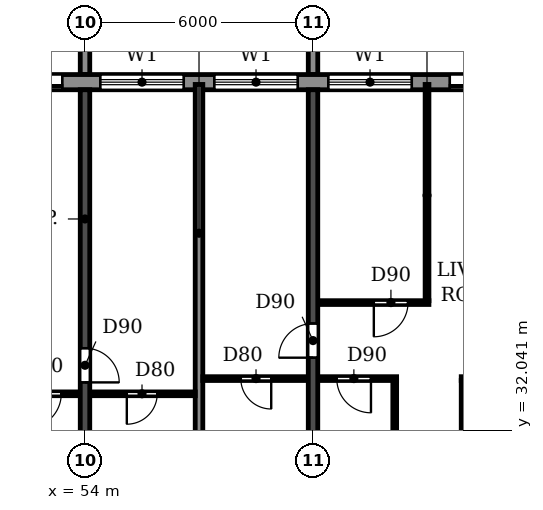
"""IFC4 building model, lengths in metres.
Left out: names, types, materials, properties, quantities, classifications, styles, units other than length and angle.
Written with IfcOpenShell. Run it as: python <this file> out.ifc"""

import sys

from ifc_helpers import new_model, si_unit, direction, frame, frame_2d, origin, place, context, subcontext, project, spatial, polyline, rectangle, outline, extrude, source, transform, mapped, element, fill, save


model = new_model("IFC4")
c1 = context("Model", 3, precision=1e-05, world=origin(), true_north=direction((0.0, 1.0)))
c2 = subcontext(c1, "Body", "Model", "MODEL_VIEW")
j1 = project(units=[si_unit("LENGTHUNIT", "METRE"), si_unit("PLANEANGLEUNIT", "RADIAN")], contexts=[c1])
p1 = place(None, origin())
s1 = spatial("IfcSite", under=j1, at=p1, CompositionType="ELEMENT")
p2 = place(p1, origin())
s2 = spatial("IfcBuilding", under=s1, at=p2, CompositionType="ELEMENT")
p3 = place(p2, frame((0.0, 0.0, 231.3)))
s3 = spatial("IfcBuildingStorey", under=s2, at=p3, CompositionType="ELEMENT", Elevation=231.3)
p4 = place(p3, frame((54.0, 30.5, 0.0), z_axis=(0.0, 0.0, 1.0), x_axis=(0.0, 1.0, 0.0)))
e1 = element("IfcWall", 1, at=p4, inside=s3, PredefinedType="SHEAR", context=c2, shape_type="SweptSolid", body=[
    extrude(rectangle(XDim=10.5, YDim=0.25, at=frame_2d((5.25, 0.0))), origin(), (0.0, 0.0, 1.0), 3.08),
])
p5 = place(p4, frame((2.8, 0.0, 0.0)))
e2 = element("IfcOpeningElement", 2, at=p5, cuts=e1, PredefinedType="OPENING", context=c2, shape_type="SweptSolid", body=[
    extrude(rectangle(XDim=0.9, YDim=2.1, at=frame_2d((0.45, 1.05))), frame((0.0, 0.135, 0.0), z_axis=(0.0, -1.0, 0.0), x_axis=(1.0, 0.0, 0.0)), (0.0, 0.0, 1.0), 0.27),
])
p6 = place(p3, frame((60.0, 30.5, 0.0), z_axis=(0.0, 0.0, 1.0), x_axis=(0.0, 1.0, 0.0)))
e3 = element("IfcWall", 3, at=p6, inside=s3, PredefinedType="SHEAR", context=c2, shape_type="SweptSolid", body=[
    extrude(rectangle(XDim=10.5, YDim=0.25, at=frame_2d((5.25, 0.0))), origin(), (0.0, 0.0, 1.0), 3.08),
])
p7 = place(p6, frame((3.45, 0.0, 0.0)))
e4 = element("IfcOpeningElement", 4, at=p7, cuts=e3, PredefinedType="OPENING", context=c2, shape_type="SweptSolid", body=[
    extrude(rectangle(XDim=0.9, YDim=2.1, at=frame_2d((0.45, 1.05))), frame((0.0, 0.135, 0.0), z_axis=(0.0, -1.0, 0.0), x_axis=(1.0, 0.0, 0.0)), (0.0, 0.0, 1.0), 0.27),
])
p8 = place(p3, frame((79.317, 41.2, 0.0), z_axis=(0.0, 0.0, 1.0), x_axis=(-1.0, 0.0, 0.0)))
e5 = element("IfcWall", 5, at=p8, inside=s3, PredefinedType="STANDARD", context=c2, shape_type="SweptSolid", body=[
    extrude(rectangle(XDim=56.634, YDim=0.4, at=frame_2d((28.317, 0.0))), origin(), (0.0, 0.0, 1.0), 3.08),
])
p9 = place(p8, frame((52.917, 0.0, 0.0)))
e6 = element("IfcOpeningElement", 6, at=p9, cuts=e5, PredefinedType="OPENING", context=c2, shape_type="SweptSolid", body=[
    extrude(rectangle(XDim=1.8, YDim=2.4, at=frame_2d((0.9, 1.2))), frame((0.0, 0.21, 0.0), z_axis=(0.0, -1.0, 0.0), x_axis=(1.0, 0.0, 0.0)), (0.0, 0.0, 1.0), 0.42),
])
p10 = place(p8, frame((49.717, 0.0, 0.9)))
e7 = element("IfcOpeningElement", 7, at=p10, cuts=e5, PredefinedType="OPENING", context=c2, shape_type="SweptSolid", body=[
    extrude(rectangle(XDim=2.2, YDim=1.5, at=frame_2d((1.1, 0.75))), frame((0.0, 0.21, 0.0), z_axis=(0.0, -1.0, 0.0), x_axis=(1.0, 0.0, 0.0)), (0.0, 0.0, 1.0), 0.42),
])
p11 = place(p8, frame((46.717, 0.0, 0.9)))
e8 = element("IfcOpeningElement", 8, at=p11, cuts=e5, PredefinedType="OPENING", context=c2, shape_type="SweptSolid", body=[
    extrude(rectangle(XDim=2.2, YDim=1.5, at=frame_2d((1.1, 0.75))), frame((0.0, 0.21, 0.0), z_axis=(0.0, -1.0, 0.0), x_axis=(1.0, 0.0, 0.0)), (0.0, 0.0, 1.0), 0.42),
])
p12 = place(p8, frame((43.717, 0.0, 0.9)))
e9 = element("IfcOpeningElement", 9, at=p12, cuts=e5, PredefinedType="OPENING", context=c2, shape_type="SweptSolid", body=[
    extrude(rectangle(XDim=2.2, YDim=1.5, at=frame_2d((1.1, 0.75))), frame((0.0, 0.21, 0.0), z_axis=(0.0, -1.0, 0.0), x_axis=(1.0, 0.0, 0.0)), (0.0, 0.0, 1.0), 0.42),
])
p13 = place(p8, frame((40.717, 0.0, 0.9)))
e10 = element("IfcOpeningElement", 10, at=p13, cuts=e5, PredefinedType="OPENING", context=c2, shape_type="SweptSolid", body=[
    extrude(rectangle(XDim=2.2, YDim=1.5, at=frame_2d((1.1, 0.75))), frame((0.0, 0.21, 0.0), z_axis=(0.0, -1.0, 0.0), x_axis=(1.0, 0.0, 0.0)), (0.0, 0.0, 1.0), 0.42),
])
p14 = place(p8, frame((37.917, 0.0, 0.0)))
e11 = element("IfcOpeningElement", 11, at=p14, cuts=e5, PredefinedType="OPENING", context=c2, shape_type="SweptSolid", body=[
    extrude(rectangle(XDim=1.8, YDim=2.4, at=frame_2d((0.9, 1.2))), frame((0.0, 0.21, 0.0), z_axis=(0.0, -1.0, 0.0), x_axis=(1.0, 0.0, 0.0)), (0.0, 0.0, 1.0), 0.42),
])
p15 = place(p8, frame((34.717, 0.0, 0.9)))
e12 = element("IfcOpeningElement", 12, at=p15, cuts=e5, PredefinedType="OPENING", context=c2, shape_type="SweptSolid", body=[
    extrude(rectangle(XDim=2.2, YDim=1.5, at=frame_2d((1.1, 0.75))), frame((0.0, 0.21, 0.0), z_axis=(0.0, -1.0, 0.0), x_axis=(1.0, 0.0, 0.0)), (0.0, 0.0, 1.0), 0.42),
])
p16 = place(p8, frame((31.917, 0.0, 0.0)))
e13 = element("IfcOpeningElement", 13, at=p16, cuts=e5, PredefinedType="OPENING", context=c2, shape_type="SweptSolid", body=[
    extrude(rectangle(XDim=1.8, YDim=2.4, at=frame_2d((0.9, 1.2))), frame((0.0, 0.21, 0.0), z_axis=(0.0, -1.0, 0.0), x_axis=(1.0, 0.0, 0.0)), (0.0, 0.0, 1.0), 0.42),
])
p17 = place(p8, frame((28.717, 0.0, 0.9)))
e14 = element("IfcOpeningElement", 14, at=p17, cuts=e5, PredefinedType="OPENING", context=c2, shape_type="SweptSolid", body=[
    extrude(rectangle(XDim=2.2, YDim=1.5, at=frame_2d((1.1, 0.75))), frame((0.0, 0.21, 0.0), z_axis=(0.0, -1.0, 0.0), x_axis=(1.0, 0.0, 0.0)), (0.0, 0.0, 1.0), 0.42),
])
p18 = place(p8, frame((25.917, 0.0, 0.0)))
e15 = element("IfcOpeningElement", 15, at=p18, cuts=e5, PredefinedType="OPENING", context=c2, shape_type="SweptSolid", body=[
    extrude(rectangle(XDim=1.8, YDim=2.4, at=frame_2d((0.9, 1.2))), frame((0.0, 0.21, 0.0), z_axis=(0.0, -1.0, 0.0), x_axis=(1.0, 0.0, 0.0)), (0.0, 0.0, 1.0), 0.42),
])
p19 = place(p8, frame((22.717, 0.0, 0.9)))
e16 = element("IfcOpeningElement", 16, at=p19, cuts=e5, PredefinedType="OPENING", context=c2, shape_type="SweptSolid", body=[
    extrude(rectangle(XDim=2.2, YDim=1.5, at=frame_2d((1.1, 0.75))), frame((0.0, 0.21, 0.0), z_axis=(0.0, -1.0, 0.0), x_axis=(1.0, 0.0, 0.0)), (0.0, 0.0, 1.0), 0.42),
])
p20 = place(p8, frame((19.717, 0.0, 0.9)))
e17 = element("IfcOpeningElement", 17, at=p20, cuts=e5, PredefinedType="OPENING", context=c2, shape_type="SweptSolid", body=[
    extrude(rectangle(XDim=2.2, YDim=1.5, at=frame_2d((1.1, 0.75))), frame((0.0, 0.21, 0.0), z_axis=(0.0, -1.0, 0.0), x_axis=(1.0, 0.0, 0.0)), (0.0, 0.0, 1.0), 0.42),
])
p21 = place(p8, frame((16.717, 0.0, 0.9)))
e18 = element("IfcOpeningElement", 18, at=p21, cuts=e5, PredefinedType="OPENING", context=c2, shape_type="SweptSolid", body=[
    extrude(rectangle(XDim=2.2, YDim=1.5, at=frame_2d((1.1, 0.75))), frame((0.0, 0.21, 0.0), z_axis=(0.0, -1.0, 0.0), x_axis=(1.0, 0.0, 0.0)), (0.0, 0.0, 1.0), 0.42),
])
p22 = place(p8, frame((13.917, 0.0, 0.0)))
e19 = element("IfcOpeningElement", 19, at=p22, cuts=e5, PredefinedType="OPENING", context=c2, shape_type="SweptSolid", body=[
    extrude(rectangle(XDim=1.8, YDim=2.4, at=frame_2d((0.9, 1.2))), frame((0.0, 0.21, 0.0), z_axis=(0.0, -1.0, 0.0), x_axis=(1.0, 0.0, 0.0)), (0.0, 0.0, 1.0), 0.42),
])
p23 = place(p8, frame((10.717, 0.0, 0.9)))
e20 = element("IfcOpeningElement", 20, at=p23, cuts=e5, PredefinedType="OPENING", context=c2, shape_type="SweptSolid", body=[
    extrude(rectangle(XDim=2.2, YDim=1.5, at=frame_2d((1.1, 0.75))), frame((0.0, 0.21, 0.0), z_axis=(0.0, -1.0, 0.0), x_axis=(1.0, 0.0, 0.0)), (0.0, 0.0, 1.0), 0.42),
])
p24 = place(p8, frame((7.917, 0.0, 0.0)))
e21 = element("IfcOpeningElement", 21, at=p24, cuts=e5, PredefinedType="OPENING", context=c2, shape_type="SweptSolid", body=[
    extrude(rectangle(XDim=1.8, YDim=2.4, at=frame_2d((0.9, 1.2))), frame((0.0, 0.21, 0.0), z_axis=(0.0, -1.0, 0.0), x_axis=(1.0, 0.0, 0.0)), (0.0, 0.0, 1.0), 0.42),
])
p25 = place(p8, frame((4.717, 0.0, 0.9)))
e22 = element("IfcOpeningElement", 22, at=p25, cuts=e5, PredefinedType="OPENING", context=c2, shape_type="SweptSolid", body=[
    extrude(rectangle(XDim=2.2, YDim=1.5, at=frame_2d((1.1, 0.75))), frame((0.0, 0.21, 0.0), z_axis=(0.0, -1.0, 0.0), x_axis=(1.0, 0.0, 0.0)), (0.0, 0.0, 1.0), 0.42),
])
p26 = place(p8, frame((1.917, 0.0, 0.0)))
e23 = element("IfcOpeningElement", 23, at=p26, cuts=e5, PredefinedType="OPENING", context=c2, shape_type="SweptSolid", body=[
    extrude(rectangle(XDim=1.8, YDim=2.4, at=frame_2d((0.9, 1.2))), frame((0.0, 0.21, 0.0), z_axis=(0.0, -1.0, 0.0), x_axis=(1.0, 0.0, 0.0)), (0.0, 0.0, 1.0), 0.42),
])
m1 = source(origin(), c2, "Body", "SweptSolid", [
    extrude(outline(polyline([(0.0, 0.0), (0.25, 0.0), (0.25, 3.1), (0.0, 3.1), (0.0, 0.0)])), origin(), (0.0, 0.0, 1.0), 3.1),
])
for number, where in (
    (24, (53.875, 41.4, 0.0)),
    (25, (59.875, 41.4, 0.0)),
):
    element("IfcWall", number, at=place(p3, frame(where)), inside=s3, PredefinedType="STANDARD", context=c2, shape_type="MappedRepresentation", body=[
        mapped(m1, transform((0.0, 0.0, 0.0))),
    ])
p27 = place(p3, frame((57.0, 30.51, 0.0), z_axis=(0.0, 0.0, 1.0), x_axis=(0.0, 1.0, 0.0)))
e26 = element("IfcWall", 26, at=p27, inside=s3, PredefinedType="PARTITIONING", context=c2, shape_type="SweptSolid", body=[
    extrude(rectangle(XDim=10.63, YDim=0.2, at=frame_2d((5.315, 0.0))), origin(), (0.0, 0.0, 1.0), 3.08),
])
p28 = place(p3, frame((51.8, 33.0, 0.0), z_axis=(0.0, 0.0, 1.0), x_axis=(1.0, 0.0, 0.0)))
e27 = element("IfcWall", 27, at=p28, inside=s3, PredefinedType="PARTITIONING", context=c2, shape_type="SweptSolid", body=[
    extrude(rectangle(XDim=2.065, YDim=0.1, at=frame_2d((1.032, 0.0))), origin(), (0.0, 0.0, 1.0), 3.08),
])
p29 = place(p28, frame((0.675, 0.0, 0.0)))
e28 = element("IfcOpeningElement", 28, at=p29, cuts=e27, PredefinedType="OPENING", context=c2, shape_type="SweptSolid", body=[
    extrude(rectangle(XDim=0.9, YDim=2.1, at=frame_2d((0.45, 1.05))), frame((0.0, 0.06, 0.0), z_axis=(0.0, -1.0, 0.0), x_axis=(1.0, 0.0, 0.0)), (0.0, 0.0, 1.0), 0.12),
])
p30 = place(p3, frame((54.135, 33.0, 0.0), z_axis=(0.0, 0.0, 1.0), x_axis=(1.0, 0.0, 0.0)))
e29 = element("IfcWall", 29, at=p30, inside=s3, PredefinedType="PARTITIONING", context=c2, shape_type="SweptSolid", body=[
    extrude(rectangle(XDim=2.765, YDim=0.1, at=frame_2d((1.382, 0.0))), origin(), (0.0, 0.0, 1.0), 3.08),
])
p31 = place(p30, frame((0.965, 0.0, 0.0)))
e30 = element("IfcOpeningElement", 30, at=p31, cuts=e29, PredefinedType="OPENING", context=c2, shape_type="SweptSolid", body=[
    extrude(rectangle(XDim=0.8, YDim=2.1, at=frame_2d((0.4, 1.05))), frame((0.0, 0.06, 0.0), z_axis=(0.0, -1.0, 0.0), x_axis=(1.0, 0.0, 0.0)), (0.0, 0.0, 1.0), 0.12),
])
p32 = place(p3, frame((57.1, 33.4, 0.0), z_axis=(0.0, 0.0, 1.0), x_axis=(1.0, 0.0, 0.0)))
e31 = element("IfcWall", 31, at=p32, inside=s3, PredefinedType="PARTITIONING", context=c2, shape_type="SweptSolid", body=[
    extrude(rectangle(XDim=2.765, YDim=0.1, at=frame_2d((1.382, 0.0))), origin(), (0.0, 0.0, 1.0), 3.08),
])
p33 = place(p32, frame((1.0, 0.0, 0.0)))
e32 = element("IfcOpeningElement", 32, at=p33, cuts=e31, PredefinedType="OPENING", context=c2, shape_type="SweptSolid", body=[
    extrude(rectangle(XDim=0.8, YDim=2.1, at=frame_2d((0.4, 1.05))), frame((0.0, 0.06, 0.0), z_axis=(0.0, -1.0, 0.0), x_axis=(1.0, 0.0, 0.0)), (0.0, 0.0, 1.0), 0.12),
])
p34 = place(p3, frame((60.135, 33.4, 0.0), z_axis=(0.0, 0.0, 1.0), x_axis=(1.0, 0.0, 0.0)))
e33 = element("IfcWall", 33, at=p34, inside=s3, PredefinedType="PARTITIONING", context=c2, shape_type="SweptSolid", body=[
    extrude(rectangle(XDim=2.065, YDim=0.1, at=frame_2d((1.032, 0.0))), origin(), (0.0, 0.0, 1.0), 3.08),
])
p35 = place(p34, frame((0.49, 0.0, 0.0)))
e34 = element("IfcOpeningElement", 34, at=p35, cuts=e33, PredefinedType="OPENING", context=c2, shape_type="SweptSolid", body=[
    extrude(rectangle(XDim=0.9, YDim=2.1, at=frame_2d((0.45, 1.05))), frame((0.0, 0.06, 0.0), z_axis=(0.0, -1.0, 0.0), x_axis=(1.0, 0.0, 0.0)), (0.0, 0.0, 1.0), 0.12),
])
p36 = place(p3, frame((63.9, 33.4, 0.0), z_axis=(0.0, 0.0, 1.0), x_axis=(1.0, 0.0, 0.0)))
e35 = element("IfcWall", 35, at=p36, inside=s3, PredefinedType="PARTITIONING", context=c2, shape_type="SweptSolid", body=[
    extrude(rectangle(XDim=1.965, YDim=0.1, at=frame_2d((0.982, 0.0))), origin(), (0.0, 0.0, 1.0), 3.08),
])
p37 = place(p36, frame((0.675, 0.0, 0.0)))
e36 = element("IfcOpeningElement", 36, at=p37, cuts=e35, PredefinedType="OPENING", context=c2, shape_type="SweptSolid", body=[
    extrude(rectangle(XDim=0.8, YDim=2.1, at=frame_2d((0.4, 1.05))), frame((0.0, 0.06, 0.0), z_axis=(0.0, -1.0, 0.0), x_axis=(1.0, 0.0, 0.0)), (0.0, 0.0, 1.0), 0.12),
])
p38 = place(p3, frame((60.135, 35.4, 0.0), z_axis=(0.0, 0.0, 1.0), x_axis=(1.0, 0.0, 0.0)))
e37 = element("IfcWall", 37, at=p38, inside=s3, PredefinedType="PARTITIONING", context=c2, shape_type="SweptSolid", body=[
    extrude(rectangle(XDim=2.915, YDim=0.1, at=frame_2d((1.458, 0.0))), origin(), (0.0, 0.0, 1.0), 3.08),
])
p39 = place(p38, frame((1.465, 0.0, 0.0)))
e38 = element("IfcOpeningElement", 38, at=p39, cuts=e37, PredefinedType="OPENING", context=c2, shape_type="SweptSolid", body=[
    extrude(rectangle(XDim=0.9, YDim=2.1, at=frame_2d((0.45, 1.05))), frame((0.0, 0.06, 0.0), z_axis=(0.0, -1.0, 0.0), x_axis=(1.0, 0.0, 0.0)), (0.0, 0.0, 1.0), 0.12),
])
p40 = place(p3, frame((62.15, 30.51, 0.0), z_axis=(0.0, 0.0, 1.0), x_axis=(0.0, 1.0, 0.0)))
e39 = element("IfcWall", 39, at=p40, inside=s3, PredefinedType="PARTITIONING", context=c2, shape_type="SweptSolid", body=[
    extrude(rectangle(XDim=2.84, YDim=0.1, at=frame_2d((1.42, 0.0))), origin(), (0.0, 0.0, 1.0), 3.08),
])
p41 = place(p3, frame((63.0, 35.45, 0.0), z_axis=(0.0, 0.0, 1.0), x_axis=(0.0, 1.0, 0.0)))
e40 = element("IfcWall", 40, at=p41, inside=s3, PredefinedType="PARTITIONING", context=c2, shape_type="SweptSolid", body=[
    extrude(rectangle(XDim=5.69, YDim=0.1, at=frame_2d((2.845, 0.0))), origin(), (0.0, 0.0, 1.0), 3.08),
])
p42 = place(p3, frame((63.95, 30.51, 0.0), z_axis=(0.0, 0.0, 1.0), x_axis=(0.0, 1.0, 0.0)))
e41 = element("IfcWall", 41, at=p42, inside=s3, PredefinedType="PARTITIONING", context=c2, shape_type="SweptSolid", body=[
    extrude(rectangle(XDim=2.84, YDim=0.1, at=frame_2d((1.42, 0.0))), origin(), (0.0, 0.0, 1.0), 3.08),
])
p43 = place(p18, origin())
e42 = element("IfcDoor", 42, at=p43, inside=s3, OperationType="DOUBLE_DOOR_SLIDING", PredefinedType="DOOR", context=c2, shape_type="SweptSolid", body=[
    extrude(rectangle(XDim=1.8, YDim=2.4, at=frame_2d((0.9, 1.2))), frame((0.0, 0.025, 0.0), z_axis=(0.0, -1.0, 0.0), x_axis=(1.0, 0.0, 0.0)), (0.0, 0.0, 1.0), 0.05),
])
fill(e15, e42)
p44 = place(p19, origin())
e43 = element("IfcWindow", 43, at=p44, inside=s3, PartitioningType="DOUBLE_PANEL_HORIZONTAL", PredefinedType="WINDOW", context=c2, shape_type="SweptSolid", body=[
    extrude(rectangle(XDim=2.2, YDim=1.5, at=frame_2d((1.1, 0.75))), frame((0.0, 0.03, 0.0), z_axis=(0.0, -1.0, 0.0), x_axis=(1.0, 0.0, 0.0)), (0.0, 0.0, 1.0), 0.06),
])
fill(e16, e43)
p45 = place(p20, origin())
e44 = element("IfcWindow", 44, at=p45, inside=s3, PartitioningType="DOUBLE_PANEL_HORIZONTAL", PredefinedType="WINDOW", context=c2, shape_type="SweptSolid", body=[
    extrude(rectangle(XDim=2.2, YDim=1.5, at=frame_2d((1.1, 0.75))), frame((0.0, 0.03, 0.0), z_axis=(0.0, -1.0, 0.0), x_axis=(1.0, 0.0, 0.0)), (0.0, 0.0, 1.0), 0.06),
])
fill(e17, e44)
p46 = place(p21, origin())
e45 = element("IfcWindow", 45, at=p46, inside=s3, PartitioningType="DOUBLE_PANEL_HORIZONTAL", PredefinedType="WINDOW", context=c2, shape_type="SweptSolid", body=[
    extrude(rectangle(XDim=2.2, YDim=1.5, at=frame_2d((1.1, 0.75))), frame((0.0, 0.03, 0.0), z_axis=(0.0, -1.0, 0.0), x_axis=(1.0, 0.0, 0.0)), (0.0, 0.0, 1.0), 0.06),
])
fill(e18, e45)
p47 = place(p22, origin())
e46 = element("IfcDoor", 46, at=p47, inside=s3, OperationType="DOUBLE_DOOR_SLIDING", PredefinedType="DOOR", context=c2, shape_type="SweptSolid", body=[
    extrude(rectangle(XDim=1.8, YDim=2.4, at=frame_2d((0.9, 1.2))), frame((0.0, 0.025, 0.0), z_axis=(0.0, -1.0, 0.0), x_axis=(1.0, 0.0, 0.0)), (0.0, 0.0, 1.0), 0.05),
])
fill(e19, e46)
p48 = place(p31, frame((0.8, 0.0, 0.0), z_axis=(0.0, 0.0, 1.0), x_axis=(-1.0, 0.0, 0.0)))
e47 = element("IfcDoor", 47, at=p48, inside=s3, OperationType="SINGLE_SWING_RIGHT", PredefinedType="DOOR", context=c2, shape_type="SweptSolid", body=[
    extrude(rectangle(XDim=0.8, YDim=2.1, at=frame_2d((0.4, 1.05))), frame((0.0, 0.025, 0.0), z_axis=(0.0, -1.0, 0.0), x_axis=(1.0, 0.0, 0.0)), (0.0, 0.0, 1.0), 0.05),
])
fill(e30, e47)
p49 = place(p29, frame((0.9, 0.0, 0.0), z_axis=(0.0, 0.0, 1.0), x_axis=(-1.0, 0.0, 0.0)))
e48 = element("IfcDoor", 48, at=p49, inside=s3, OperationType="SINGLE_SWING_RIGHT", PredefinedType="DOOR", context=c2, shape_type="SweptSolid", body=[
    extrude(rectangle(XDim=0.9, YDim=2.1, at=frame_2d((0.45, 1.05))), frame((0.0, 0.025, 0.0), z_axis=(0.0, -1.0, 0.0), x_axis=(1.0, 0.0, 0.0)), (0.0, 0.0, 1.0), 0.05),
])
fill(e28, e48)
p50 = place(p5, frame((0.9, 0.0, 0.0), z_axis=(0.0, 0.0, 1.0), x_axis=(-1.0, 0.0, 0.0)))
e49 = element("IfcDoor", 49, at=p50, inside=s3, OperationType="SINGLE_SWING_RIGHT", PredefinedType="DOOR", context=c2, shape_type="SweptSolid", body=[
    extrude(rectangle(XDim=0.9, YDim=2.1, at=frame_2d((0.45, 1.05))), frame((0.0, 0.025, 0.0), z_axis=(0.0, -1.0, 0.0), x_axis=(1.0, 0.0, 0.0)), (0.0, 0.0, 1.0), 0.05),
])
fill(e2, e49)
p51 = place(p33, frame((0.8, 0.0, 0.0), z_axis=(0.0, 0.0, 1.0), x_axis=(-1.0, 0.0, 0.0)))
e50 = element("IfcDoor", 50, at=p51, inside=s3, OperationType="SINGLE_SWING_LEFT", PredefinedType="DOOR", context=c2, shape_type="SweptSolid", body=[
    extrude(rectangle(XDim=0.8, YDim=2.1, at=frame_2d((0.4, 1.05))), frame((0.0, 0.025, 0.0), z_axis=(0.0, -1.0, 0.0), x_axis=(1.0, 0.0, 0.0)), (0.0, 0.0, 1.0), 0.05),
])
fill(e32, e50)
p52 = place(p7, origin())
e51 = element("IfcDoor", 51, at=p52, inside=s3, OperationType="SINGLE_SWING_LEFT", PredefinedType="DOOR", context=c2, shape_type="SweptSolid", body=[
    extrude(rectangle(XDim=0.9, YDim=2.1, at=frame_2d((0.45, 1.05))), frame((0.0, 0.025, 0.0), z_axis=(0.0, -1.0, 0.0), x_axis=(1.0, 0.0, 0.0)), (0.0, 0.0, 1.0), 0.05),
])
fill(e4, e51)
p53 = place(p35, frame((0.9, 0.0, 0.0), z_axis=(0.0, 0.0, 1.0), x_axis=(-1.0, 0.0, 0.0)))
e52 = element("IfcDoor", 52, at=p53, inside=s3, OperationType="SINGLE_SWING_LEFT", PredefinedType="DOOR", context=c2, shape_type="SweptSolid", body=[
    extrude(rectangle(XDim=0.9, YDim=2.1, at=frame_2d((0.45, 1.05))), frame((0.0, 0.025, 0.0), z_axis=(0.0, -1.0, 0.0), x_axis=(1.0, 0.0, 0.0)), (0.0, 0.0, 1.0), 0.05),
])
fill(e34, e52)
p54 = place(p39, frame((0.9, 0.0, 0.0), z_axis=(0.0, 0.0, 1.0), x_axis=(-1.0, 0.0, 0.0)))
e53 = element("IfcDoor", 53, at=p54, inside=s3, OperationType="SINGLE_SWING_RIGHT", PredefinedType="DOOR", context=c2, shape_type="SweptSolid", body=[
    extrude(rectangle(XDim=0.9, YDim=2.1, at=frame_2d((0.45, 1.05))), frame((0.0, 0.025, 0.0), z_axis=(0.0, -1.0, 0.0), x_axis=(1.0, 0.0, 0.0)), (0.0, 0.0, 1.0), 0.05),
])
fill(e38, e53)
save(model, sys.argv[1])
